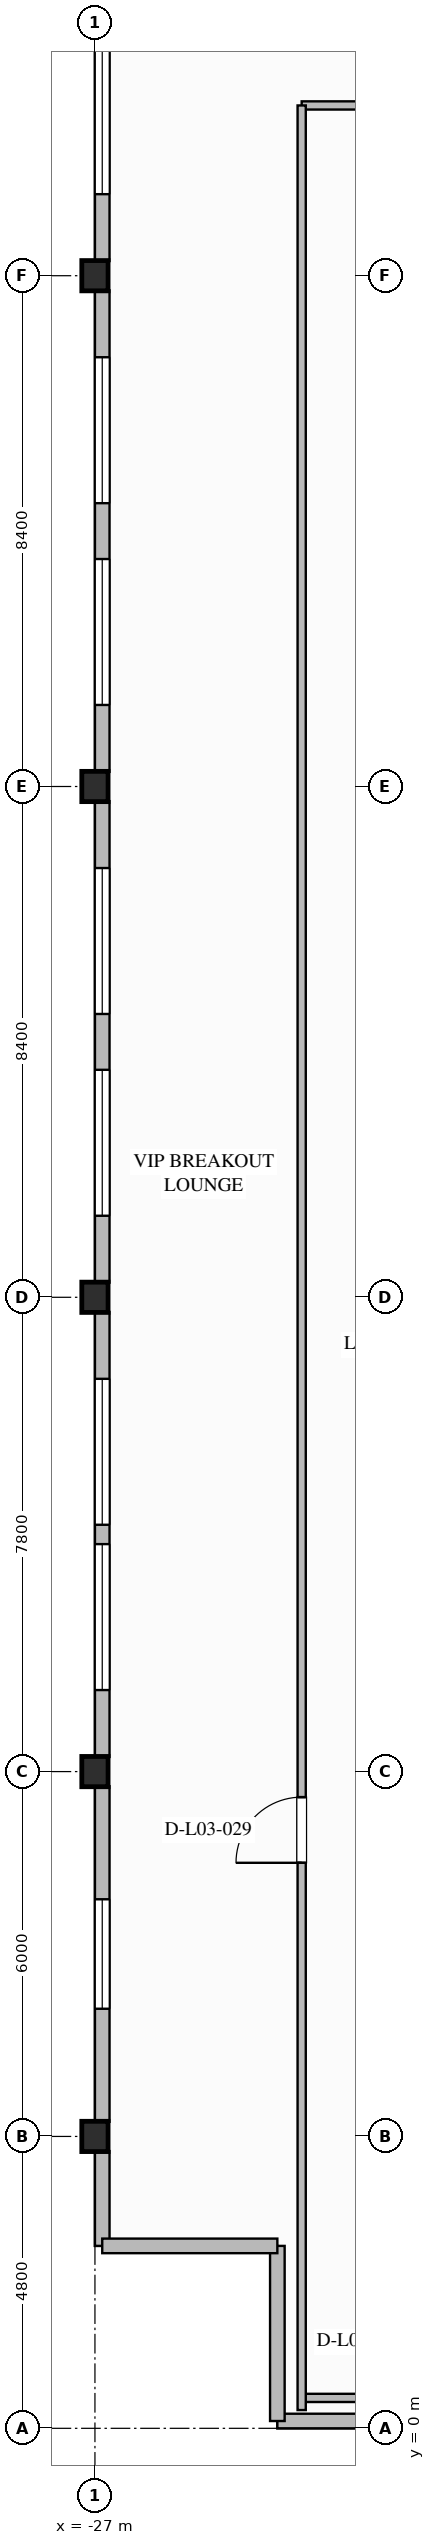
"""IFC4 building model, lengths in metres.
Left out: names, types, materials, properties, quantities, classifications, styles, units other than length and angle.
Written with IfcOpenShell. Run it as: python <this file> out.ifc"""

import sys

from ifc_helpers import new_model, si_unit, direction, frame, frame_2d, origin, origin_2d, place, context, subcontext, project, spatial, rectangle, i_section, extrude, element, fill, save


model = new_model("IFC4")
c1 = context("Model", 3, precision=1e-05, world=origin(), true_north=direction((0.0, 1.0)))
c2 = subcontext(c1, "Body", "Model", "MODEL_VIEW")
j1 = project(units=[si_unit("LENGTHUNIT", "METRE"), si_unit("PLANEANGLEUNIT", "RADIAN")], contexts=[c1])
p1 = place(None, origin())
s1 = spatial("IfcSite", under=j1, at=p1, CompositionType="ELEMENT")
p2 = place(p1, origin())
s2 = spatial("IfcBuilding", under=s1, at=p2, CompositionType="ELEMENT")
p3 = place(p2, frame((0.0, 0.0, 17.2)))
s3 = spatial("IfcBuildingStorey", under=s2, at=p3, CompositionType="ELEMENT", Elevation=17.2)
for number, where, z_axis, x_axis in (
    (1, (-27.0, 4.8, 0.0), (0.0, 0.0, 1.0), (1.0, 0.0, 0.0)),
    (2, (-27.0, 10.8, 0.0), (0.0, 0.0, 1.0), (1.0, 0.0, 0.0)),
    (3, (-27.0, 18.6, 0.0), (0.0, 0.0, 1.0), (1.0, 0.0, 0.0)),
    (4, (-27.0, 27.0, 0.0), (0.0, 0.0, 1.0), (1.0, 0.0, 0.0)),
    (5, (-27.0, 35.4, 0.0), (0.0, 0.0, 1.0), (1.0, 0.0, 0.0)),
):
    element("IfcColumn", number, at=place(p3, frame(where, z_axis=z_axis, x_axis=x_axis)), inside=s3, PredefinedType="COLUMN", context=c2, shape_type="SweptSolid", body=[
        extrude(i_section(OverallWidth=0.432, OverallDepth=0.498, WebThickness=0.056, FlangeThickness=0.089, FilletRadius=0.03, at=origin_2d()), origin(), (0.0, 0.0, 1.0), 5.2),
    ])
p4 = place(p3, frame((-26.88, 3.0, 0.0), z_axis=(0.0, 0.0, 1.0), x_axis=(0.0, 1.0, 0.0)))
e6 = element("IfcWall", 6, at=p4, inside=s3, PredefinedType="STANDARD", context=c2, shape_type="SweptSolid", body=[
    extrude(rectangle(XDim=1.559, YDim=0.24, at=frame_2d((0.78, 0.0))), origin(), (0.0, 0.0, 1.0), 4.9),
])
p5 = place(p3, frame((-26.88, 5.041, 0.0), z_axis=(0.0, 0.0, 1.0), x_axis=(0.0, 1.0, 0.0)))
e7 = element("IfcWall", 7, at=p5, inside=s3, PredefinedType="STANDARD", context=c2, shape_type="SweptSolid", body=[
    extrude(rectangle(XDim=5.518, YDim=0.24, at=frame_2d((2.759, 0.0))), origin(), (0.0, 0.0, 1.0), 4.205),
])
p6 = place(p5, frame((1.859, 0.0, 0.7)))
e8 = element("IfcOpeningElement", 8, at=p6, cuts=e7, PredefinedType="OPENING", context=c2, shape_type="SweptSolid", body=[
    extrude(rectangle(XDim=1.8, YDim=2.2, at=frame_2d((0.9, 1.1))), frame((0.0, 0.13, 0.0), z_axis=(0.0, -1.0, 0.0), x_axis=(1.0, 0.0, 0.0)), (0.0, 0.0, 1.0), 0.26),
])
p7 = place(p3, frame((-26.88, 11.041, 0.0), z_axis=(0.0, 0.0, 1.0), x_axis=(0.0, 1.0, 0.0)))
e9 = element("IfcWall", 9, at=p7, inside=s3, PredefinedType="STANDARD", context=c2, shape_type="SweptSolid", body=[
    extrude(rectangle(XDim=7.318, YDim=0.24, at=frame_2d((3.659, 0.0))), origin(), (0.0, 0.0, 1.0), 4.205),
])
p8 = place(p7, frame((1.1, 0.0, 0.7)))
e10 = element("IfcOpeningElement", 10, at=p8, cuts=e9, PredefinedType="OPENING", context=c2, shape_type="SweptSolid", body=[
    extrude(rectangle(XDim=2.4, YDim=2.4, at=frame_2d((1.2, 1.2))), frame((0.0, 0.13, 0.0), z_axis=(0.0, -1.0, 0.0), x_axis=(1.0, 0.0, 0.0)), (0.0, 0.0, 1.0), 0.26),
])
p9 = place(p7, frame((3.818, 0.0, 0.7)))
e11 = element("IfcOpeningElement", 11, at=p9, cuts=e9, PredefinedType="OPENING", context=c2, shape_type="SweptSolid", body=[
    extrude(rectangle(XDim=2.4, YDim=2.4, at=frame_2d((1.2, 1.2))), frame((0.0, 0.13, 0.0), z_axis=(0.0, -1.0, 0.0), x_axis=(1.0, 0.0, 0.0)), (0.0, 0.0, 1.0), 0.26),
])
p10 = place(p3, frame((-26.88, 18.841, 0.0), z_axis=(0.0, 0.0, 1.0), x_axis=(0.0, 1.0, 0.0)))
e12 = element("IfcWall", 12, at=p10, inside=s3, PredefinedType="STANDARD", context=c2, shape_type="SweptSolid", body=[
    extrude(rectangle(XDim=7.918, YDim=0.24, at=frame_2d((3.959, 0.0))), origin(), (0.0, 0.0, 1.0), 4.205),
])
p11 = place(p10, frame((1.1, 0.0, 0.7)))
e13 = element("IfcOpeningElement", 13, at=p11, cuts=e12, PredefinedType="OPENING", context=c2, shape_type="SweptSolid", body=[
    extrude(rectangle(XDim=2.4, YDim=2.4, at=frame_2d((1.2, 1.2))), frame((0.0, 0.13, 0.0), z_axis=(0.0, -1.0, 0.0), x_axis=(1.0, 0.0, 0.0)), (0.0, 0.0, 1.0), 0.26),
])
p12 = place(p10, frame((4.418, 0.0, 0.7)))
e14 = element("IfcOpeningElement", 14, at=p12, cuts=e12, PredefinedType="OPENING", context=c2, shape_type="SweptSolid", body=[
    extrude(rectangle(XDim=2.4, YDim=2.4, at=frame_2d((1.2, 1.2))), frame((0.0, 0.13, 0.0), z_axis=(0.0, -1.0, 0.0), x_axis=(1.0, 0.0, 0.0)), (0.0, 0.0, 1.0), 0.26),
])
p13 = place(p3, frame((-26.88, 27.241, 0.0), z_axis=(0.0, 0.0, 1.0), x_axis=(0.0, 1.0, 0.0)))
e15 = element("IfcWall", 15, at=p13, inside=s3, PredefinedType="STANDARD", context=c2, shape_type="SweptSolid", body=[
    extrude(rectangle(XDim=7.918, YDim=0.24, at=frame_2d((3.959, 0.0))), origin(), (0.0, 0.0, 1.0), 4.205),
])
p14 = place(p13, frame((1.1, 0.0, 0.7)))
e16 = element("IfcOpeningElement", 16, at=p14, cuts=e15, PredefinedType="OPENING", context=c2, shape_type="SweptSolid", body=[
    extrude(rectangle(XDim=2.4, YDim=2.4, at=frame_2d((1.2, 1.2))), frame((0.0, 0.13, 0.0), z_axis=(0.0, -1.0, 0.0), x_axis=(1.0, 0.0, 0.0)), (0.0, 0.0, 1.0), 0.26),
])
p15 = place(p13, frame((4.418, 0.0, 0.7)))
e17 = element("IfcOpeningElement", 17, at=p15, cuts=e15, PredefinedType="OPENING", context=c2, shape_type="SweptSolid", body=[
    extrude(rectangle(XDim=2.4, YDim=2.4, at=frame_2d((1.2, 1.2))), frame((0.0, 0.13, 0.0), z_axis=(0.0, -1.0, 0.0), x_axis=(1.0, 0.0, 0.0)), (0.0, 0.0, 1.0), 0.26),
])
p16 = place(p3, frame((-26.88, 35.641, 0.0), z_axis=(0.0, 0.0, 1.0), x_axis=(0.0, 1.0, 0.0)))
e18 = element("IfcWall", 18, at=p16, inside=s3, PredefinedType="STANDARD", context=c2, shape_type="SweptSolid", body=[
    extrude(rectangle(XDim=7.318, YDim=0.24, at=frame_2d((3.659, 0.0))), origin(), (0.0, 0.0, 1.0), 4.205),
])
p17 = place(p16, frame((1.1, 0.0, 0.7)))
e19 = element("IfcOpeningElement", 19, at=p17, cuts=e18, PredefinedType="OPENING", context=c2, shape_type="SweptSolid", body=[
    extrude(rectangle(XDim=2.4, YDim=2.4, at=frame_2d((1.2, 1.2))), frame((0.0, 0.13, 0.0), z_axis=(0.0, -1.0, 0.0), x_axis=(1.0, 0.0, 0.0)), (0.0, 0.0, 1.0), 0.26),
])
p18 = place(p16, frame((3.818, 0.0, 0.7)))
e20 = element("IfcOpeningElement", 20, at=p18, cuts=e18, PredefinedType="OPENING", context=c2, shape_type="SweptSolid", body=[
    extrude(rectangle(XDim=2.4, YDim=2.4, at=frame_2d((1.2, 1.2))), frame((0.0, 0.13, 0.0), z_axis=(0.0, -1.0, 0.0), x_axis=(1.0, 0.0, 0.0)), (0.0, 0.0, 1.0), 0.26),
])
p19 = place(p3, frame((-22.441, 0.12, 0.0), z_axis=(0.0, 0.0, 1.0), x_axis=(-1.0, 0.0, 0.0)))
e21 = element("IfcWall", 21, at=p19, inside=s3, PredefinedType="STANDARD", context=c2, shape_type="SweptSolid", body=[
    extrude(rectangle(XDim=1.559, YDim=0.24, at=frame_2d((0.78, 0.0))), origin(), (0.0, 0.0, 1.0), 4.9),
])
for number, where, z_axis, x_axis in (
    (22, (-24.0, 0.12, 0.0), (0.0, 0.0, 1.0), (0.0, 1.0, 0.0)),
    (23, (-24.0, 3.0, 0.0), (0.0, 0.0, 1.0), (-1.0, 0.0, 0.0)),
):
    element("IfcWall", number, at=place(p3, frame(where, z_axis=z_axis, x_axis=x_axis)), inside=s3, PredefinedType="STANDARD", context=c2, shape_type="SweptSolid", body=[
        extrude(rectangle(XDim=2.88, YDim=0.24, at=frame_2d((1.44, 0.0))), origin(), (0.0, 0.0, 1.0), 4.9),
    ])
p20 = place(p3, frame((-23.6, 38.2, 0.0), z_axis=(0.0, 0.0, 1.0), x_axis=(1.0, 0.0, 0.0)))
e24 = element("IfcWall", 24, at=p20, inside=s3, PredefinedType="PARTITIONING", context=c2, shape_type="SweptSolid", body=[
    extrude(rectangle(XDim=47.3, YDim=0.135, at=frame_2d((23.65, 0.0))), origin(), (0.0, 0.0, 1.0), 4.9),
])
p21 = place(p20, frame((39.2, 0.0, 0.0)))
e25 = element("IfcOpeningElement", 25, at=p21, cuts=e24, PredefinedType="OPENING", context=c2, shape_type="SweptSolid", body=[
    extrude(rectangle(XDim=0.98, YDim=2.1, at=frame_2d((0.49, 1.05))), frame((0.0, 0.077, 0.0), z_axis=(0.0, -1.0, 0.0), x_axis=(1.0, 0.0, 0.0)), (0.0, 0.0, 1.0), 0.155),
])
p22 = place(p20, frame((44.0, 0.0, 0.0)))
e26 = element("IfcOpeningElement", 26, at=p22, cuts=e24, PredefinedType="OPENING", context=c2, shape_type="SweptSolid", body=[
    extrude(rectangle(XDim=0.92, YDim=2.1, at=frame_2d((0.46, 1.05))), frame((0.0, 0.077, 0.0), z_axis=(0.0, -1.0, 0.0), x_axis=(1.0, 0.0, 0.0)), (0.0, 0.0, 1.0), 0.155),
])
p23 = place(p20, frame((10.0, 0.0, 0.0)))
e27 = element("IfcOpeningElement", 27, at=p23, cuts=e24, PredefinedType="OPENING", context=c2, shape_type="SweptSolid", body=[
    extrude(rectangle(XDim=1.8, YDim=2.35, at=frame_2d((0.9, 1.175))), frame((0.0, 0.077, 0.0), z_axis=(0.0, -1.0, 0.0), x_axis=(1.0, 0.0, 0.0)), (0.0, 0.0, 1.0), 0.155),
])
p24 = place(p20, frame((28.0, 0.0, 0.0)))
e28 = element("IfcOpeningElement", 28, at=p24, cuts=e24, PredefinedType="OPENING", context=c2, shape_type="SweptSolid", body=[
    extrude(rectangle(XDim=1.26, YDim=2.2, at=frame_2d((0.63, 1.1))), frame((0.0, 0.077, 0.0), z_axis=(0.0, -1.0, 0.0), x_axis=(1.0, 0.0, 0.0)), (0.0, 0.0, 1.0), 0.155),
])
p25 = place(p3, frame((-23.6, 0.5, 0.0), z_axis=(0.0, 0.0, 1.0), x_axis=(1.0, 0.0, 0.0)))
e29 = element("IfcWall", 29, at=p25, inside=s3, PredefinedType="PARTITIONING", context=c2, shape_type="SweptSolid", body=[
    extrude(rectangle(XDim=2.5, YDim=0.135, at=frame_2d((1.25, 0.0))), origin(), (0.0, 0.0, 1.0), 4.9),
])
p26 = place(p3, frame((-23.6, 0.3, 0.0), z_axis=(0.0, 0.0, 1.0), x_axis=(0.0, 1.0, 0.0)))
e30 = element("IfcWall", 30, at=p26, inside=s3, PredefinedType="PARTITIONING", context=c2, shape_type="SweptSolid", body=[
    extrude(rectangle(XDim=37.9, YDim=0.135, at=frame_2d((18.95, 0.0))), origin(), (0.0, 0.0, 1.0), 4.9),
])
p27 = place(p26, frame((9.0, 0.0, 0.0)))
e31 = element("IfcOpeningElement", 31, at=p27, cuts=e30, PredefinedType="OPENING", context=c2, shape_type="SweptSolid", body=[
    extrude(rectangle(XDim=1.08, YDim=2.04, at=frame_2d((0.54, 1.02))), frame((0.0, 0.077, 0.0), z_axis=(0.0, -1.0, 0.0), x_axis=(1.0, 0.0, 0.0)), (0.0, 0.0, 1.0), 0.155),
])
p28 = place(p6, origin())
e32 = element("IfcWindow", 32, at=p28, inside=s3, PartitioningType="SINGLE_PANEL", PredefinedType="WINDOW", context=c2, shape_type="SweptSolid", body=[
    extrude(rectangle(XDim=1.8, YDim=2.2, at=frame_2d((0.9, 1.1))), frame((0.0, 0.03, 0.0), z_axis=(0.0, -1.0, 0.0), x_axis=(1.0, 0.0, 0.0)), (0.0, 0.0, 1.0), 0.06),
])
fill(e8, e32)
p29 = place(p8, origin())
e33 = element("IfcWindow", 33, at=p29, inside=s3, PartitioningType="SINGLE_PANEL", PredefinedType="WINDOW", context=c2, shape_type="SweptSolid", body=[
    extrude(rectangle(XDim=2.4, YDim=2.4, at=frame_2d((1.2, 1.2))), frame((0.0, 0.03, 0.0), z_axis=(0.0, -1.0, 0.0), x_axis=(1.0, 0.0, 0.0)), (0.0, 0.0, 1.0), 0.06),
])
fill(e10, e33)
p30 = place(p9, origin())
e34 = element("IfcWindow", 34, at=p30, inside=s3, PartitioningType="SINGLE_PANEL", PredefinedType="WINDOW", context=c2, shape_type="SweptSolid", body=[
    extrude(rectangle(XDim=2.4, YDim=2.4, at=frame_2d((1.2, 1.2))), frame((0.0, 0.03, 0.0), z_axis=(0.0, -1.0, 0.0), x_axis=(1.0, 0.0, 0.0)), (0.0, 0.0, 1.0), 0.06),
])
fill(e11, e34)
p31 = place(p11, origin())
e35 = element("IfcWindow", 35, at=p31, inside=s3, PartitioningType="SINGLE_PANEL", PredefinedType="WINDOW", context=c2, shape_type="SweptSolid", body=[
    extrude(rectangle(XDim=2.4, YDim=2.4, at=frame_2d((1.2, 1.2))), frame((0.0, 0.03, 0.0), z_axis=(0.0, -1.0, 0.0), x_axis=(1.0, 0.0, 0.0)), (0.0, 0.0, 1.0), 0.06),
])
fill(e13, e35)
p32 = place(p12, origin())
e36 = element("IfcWindow", 36, at=p32, inside=s3, PartitioningType="SINGLE_PANEL", PredefinedType="WINDOW", context=c2, shape_type="SweptSolid", body=[
    extrude(rectangle(XDim=2.4, YDim=2.4, at=frame_2d((1.2, 1.2))), frame((0.0, 0.03, 0.0), z_axis=(0.0, -1.0, 0.0), x_axis=(1.0, 0.0, 0.0)), (0.0, 0.0, 1.0), 0.06),
])
fill(e14, e36)
p33 = place(p14, origin())
e37 = element("IfcWindow", 37, at=p33, inside=s3, PartitioningType="SINGLE_PANEL", PredefinedType="WINDOW", context=c2, shape_type="SweptSolid", body=[
    extrude(rectangle(XDim=2.4, YDim=2.4, at=frame_2d((1.2, 1.2))), frame((0.0, 0.03, 0.0), z_axis=(0.0, -1.0, 0.0), x_axis=(1.0, 0.0, 0.0)), (0.0, 0.0, 1.0), 0.06),
])
fill(e16, e37)
p34 = place(p15, origin())
e38 = element("IfcWindow", 38, at=p34, inside=s3, PartitioningType="SINGLE_PANEL", PredefinedType="WINDOW", context=c2, shape_type="SweptSolid", body=[
    extrude(rectangle(XDim=2.4, YDim=2.4, at=frame_2d((1.2, 1.2))), frame((0.0, 0.03, 0.0), z_axis=(0.0, -1.0, 0.0), x_axis=(1.0, 0.0, 0.0)), (0.0, 0.0, 1.0), 0.06),
])
fill(e17, e38)
p35 = place(p17, origin())
e39 = element("IfcWindow", 39, at=p35, inside=s3, PartitioningType="SINGLE_PANEL", PredefinedType="WINDOW", context=c2, shape_type="SweptSolid", body=[
    extrude(rectangle(XDim=2.4, YDim=2.4, at=frame_2d((1.2, 1.2))), frame((0.0, 0.03, 0.0), z_axis=(0.0, -1.0, 0.0), x_axis=(1.0, 0.0, 0.0)), (0.0, 0.0, 1.0), 0.06),
])
fill(e19, e39)
p36 = place(p27, origin())
e40 = element("IfcDoor", 40, at=p36, inside=s3, OperationType="SINGLE_SWING_LEFT", PredefinedType="DOOR", context=c2, shape_type="SweptSolid", body=[
    extrude(rectangle(XDim=1.08, YDim=2.04, at=frame_2d((0.54, 1.02))), frame((0.0, 0.025, 0.0), z_axis=(0.0, -1.0, 0.0), x_axis=(1.0, 0.0, 0.0)), (0.0, 0.0, 1.0), 0.05),
])
fill(e31, e40)
save(model, sys.argv[1])
